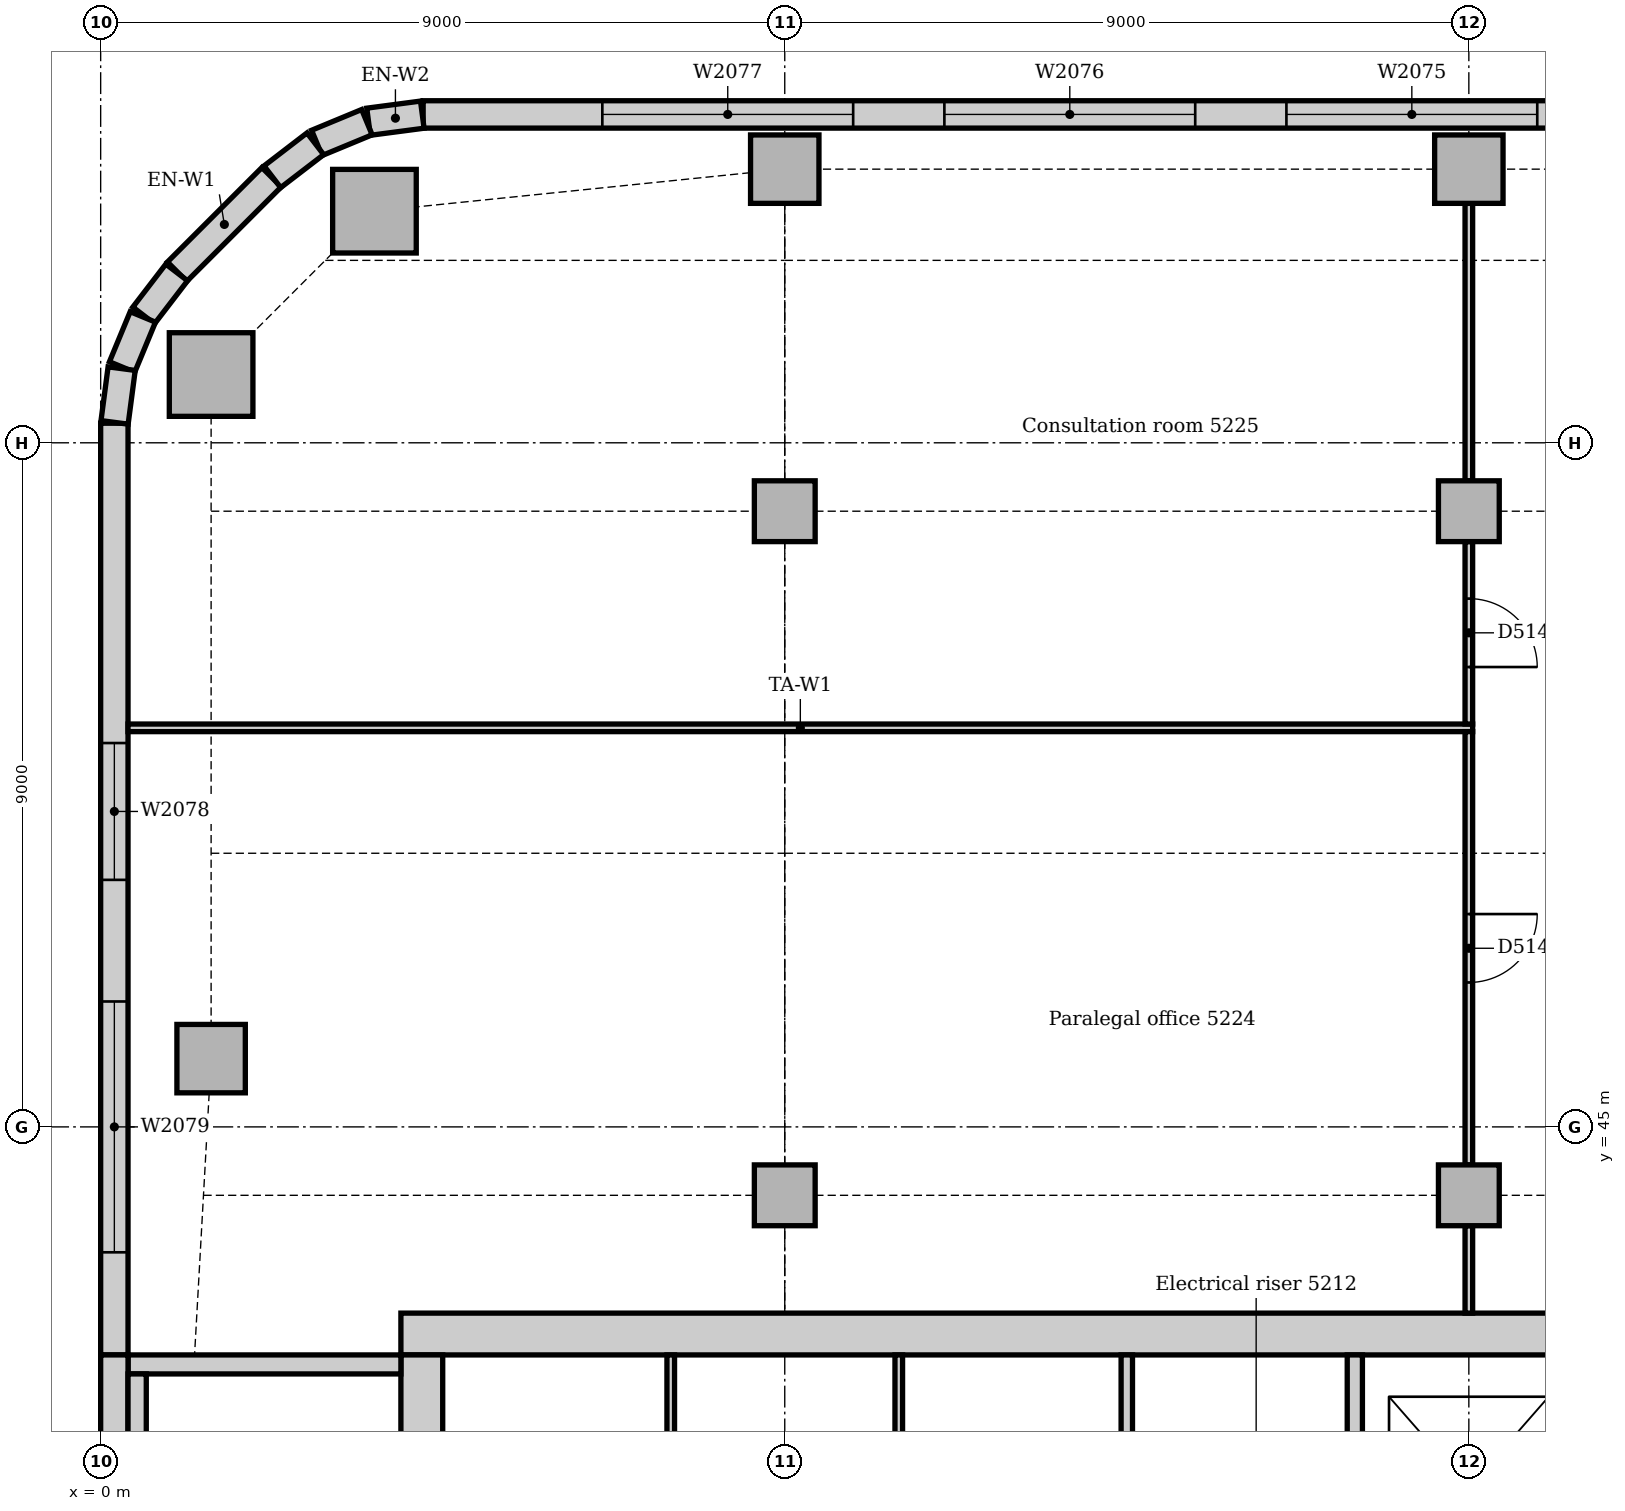
"""IFC4 building model, lengths in metres.
Left out: names, types, materials, properties, quantities, classifications, styles, units other than length and angle.
Written with IfcOpenShell. Run it as: python <this file> out.ifc"""

import sys

from ifc_helpers import new_model, si_unit, direction, frame, frame_2d, origin, origin_2d, place, context, subcontext, project, spatial, rectangle, extrude, element, fill, save


model = new_model("IFC4")
c1 = context("Model", 3, precision=1e-05, world=origin(), true_north=direction((0.0, 1.0)))
c2 = subcontext(c1, "Body", "Model", "MODEL_VIEW")
j1 = project(units=[si_unit("LENGTHUNIT", "METRE"), si_unit("PLANEANGLEUNIT", "RADIAN")], contexts=[c1])
p1 = place(None, origin())
s1 = spatial("IfcSite", under=j1, at=p1, CompositionType="ELEMENT")
p2 = place(p1, origin())
s2 = spatial("IfcBuilding", under=s1, at=p2, CompositionType="ELEMENT")
p3 = place(p2, frame((0.0, 0.0, 218.0)))
s3 = spatial("IfcBuildingStorey", under=s2, at=p3, CompositionType="ELEMENT", Elevation=218.0)
p4 = place(p3, frame((23.05, 42.275, 0.0), z_axis=(0.0, 0.0, 1.0), x_axis=(-1.0, 0.0, 0.0)))
e1 = element("IfcWall", 1, at=p4, inside=s3, PredefinedType="SOLIDWALL", context=c2, shape_type="SweptSolid", body=[
    extrude(rectangle(XDim=19.1, YDim=0.55, at=frame_2d((9.55, 0.0))), origin(), (0.0, 0.0, 1.0), 4.0),
])
p5 = place(p3, frame((4.225, 42.0, 0.0), z_axis=(0.0, 0.0, 1.0), x_axis=(0.0, -1.0, 0.0)))
e2 = element("IfcWall", 2, at=p5, inside=s3, PredefinedType="SOLIDWALL", context=c2, shape_type="SweptSolid", body=[
    extrude(rectangle(XDim=10.5, YDim=0.55, at=frame_2d((5.25, 0.0))), origin(), (0.0, 0.0, 1.0), 4.0),
])
p6 = place(p5, frame((5.3, 0.0, 0.0)))
e3 = element("IfcOpeningElement", 3, at=p6, cuts=e2, PredefinedType="OPENING", context=c2, shape_type="SweptSolid", body=[
    extrude(rectangle(XDim=1.0, YDim=2.1, at=frame_2d((0.5, 1.05))), frame((0.0, 0.285, 0.0), z_axis=(0.0, -1.0, 0.0), x_axis=(1.0, 0.0, 0.0)), (0.0, 0.0, 1.0), 0.57),
])
p7 = place(p3, frame((3.95, 41.875, 0.0), z_axis=(0.0, 0.0, 1.0), x_axis=(-1.0, 0.0, 0.0)))
e4 = element("IfcWall", 4, at=p7, inside=s3, PredefinedType="SOLIDWALL", context=c2, shape_type="SweptSolid", body=[
    extrude(rectangle(XDim=3.59, YDim=0.25, at=frame_2d((1.795, 0.0))), origin(), (0.0, 0.0, 1.0), 4.0),
])
for number, where, z_axis, x_axis in (
    (5, (3.602, 57.047, 0.0), (0.0, 0.0, 1.0), (1.0, 0.0, 0.0)),
    (6, (1.453, 54.898, 0.0), (0.0, 0.0, 1.0), (1.0, 0.0, 0.0)),
):
    element("IfcColumn", number, at=place(p3, frame(where, z_axis=z_axis, x_axis=x_axis)), inside=s3, PredefinedType="COLUMN", context=c2, shape_type="SweptSolid", body=[
        extrude(rectangle(XDim=1.1, YDim=1.1, at=origin_2d()), origin(), (0.0, 0.0, 1.0), 3.85),
    ])
for number, where, z_axis, x_axis in (
    (7, (9.0, 57.6, 0.0), (0.0, 0.0, 1.0), (1.0, 0.0, 0.0)),
    (8, (18.0, 57.6, 0.0), (0.0, 0.0, 1.0), (1.0, 0.0, 0.0)),
    (9, (1.453, 45.898, 0.0), (0.0, 0.0, 1.0), (1.0, 0.0, 0.0)),
):
    element("IfcColumn", number, at=place(p3, frame(where, z_axis=z_axis, x_axis=x_axis)), inside=s3, PredefinedType="COLUMN", context=c2, shape_type="SweptSolid", body=[
        extrude(rectangle(XDim=0.9, YDim=0.9, at=origin_2d()), origin(), (0.0, 0.0, 1.0), 3.85),
    ])
for number, where, z_axis, x_axis in (
    (10, (9.0, 44.1, 0.0), (0.0, 0.0, 1.0), (1.0, 0.0, 0.0)),
    (11, (9.0, 53.1, 0.0), (0.0, 0.0, 1.0), (1.0, 0.0, 0.0)),
    (12, (18.0, 44.1, 0.0), (0.0, 0.0, 1.0), (1.0, 0.0, 0.0)),
    (13, (18.0, 53.1, 0.0), (0.0, 0.0, 1.0), (1.0, 0.0, 0.0)),
):
    element("IfcColumn", number, at=place(p3, frame(where, z_axis=z_axis, x_axis=x_axis)), inside=s3, PredefinedType="COLUMN", context=c2, shape_type="SweptSolid", body=[
        extrude(rectangle(XDim=0.8, YDim=0.8, at=origin_2d()), origin(), (0.0, 0.0, 1.0), 3.85),
    ])
p8 = place(p3, frame((34.757, 58.32, 0.0), z_axis=(0.0, 0.0, 1.0), x_axis=(-1.0, 0.0, 0.0)))
e14 = element("IfcWall", 14, at=p8, inside=s3, PredefinedType="STANDARD", context=c2, shape_type="SweptSolid", body=[
    extrude(rectangle(XDim=30.515, YDim=0.36, at=frame_2d((15.257, 0.0))), origin(), (0.0, 0.0, 1.0), 3.85),
])
p9 = place(p8, frame((2.357, 0.0, 0.9)))
e15 = element("IfcOpeningElement", 15, at=p9, cuts=e14, PredefinedType="OPENING", context=c2, shape_type="SweptSolid", body=[
    extrude(rectangle(XDim=3.3, YDim=1.6, at=frame_2d((1.65, 0.8))), frame((0.0, 0.19, 0.0), z_axis=(0.0, -1.0, 0.0), x_axis=(1.0, 0.0, 0.0)), (0.0, 0.0, 1.0), 0.38),
])
p10 = place(p8, frame((6.857, 0.0, 0.9)))
e16 = element("IfcOpeningElement", 16, at=p10, cuts=e14, PredefinedType="OPENING", context=c2, shape_type="SweptSolid", body=[
    extrude(rectangle(XDim=3.3, YDim=1.6, at=frame_2d((1.65, 0.8))), frame((0.0, 0.19, 0.0), z_axis=(0.0, -1.0, 0.0), x_axis=(1.0, 0.0, 0.0)), (0.0, 0.0, 1.0), 0.38),
])
p11 = place(p8, frame((11.357, 0.0, 0.9)))
e17 = element("IfcOpeningElement", 17, at=p11, cuts=e14, PredefinedType="OPENING", context=c2, shape_type="SweptSolid", body=[
    extrude(rectangle(XDim=3.3, YDim=1.6, at=frame_2d((1.65, 0.8))), frame((0.0, 0.19, 0.0), z_axis=(0.0, -1.0, 0.0), x_axis=(1.0, 0.0, 0.0)), (0.0, 0.0, 1.0), 0.38),
])
p12 = place(p8, frame((15.857, 0.0, 0.9)))
e18 = element("IfcOpeningElement", 18, at=p12, cuts=e14, PredefinedType="OPENING", context=c2, shape_type="SweptSolid", body=[
    extrude(rectangle(XDim=3.3, YDim=1.6, at=frame_2d((1.65, 0.8))), frame((0.0, 0.19, 0.0), z_axis=(0.0, -1.0, 0.0), x_axis=(1.0, 0.0, 0.0)), (0.0, 0.0, 1.0), 0.38),
])
p13 = place(p8, frame((20.357, 0.0, 0.9)))
e19 = element("IfcOpeningElement", 19, at=p13, cuts=e14, PredefinedType="OPENING", context=c2, shape_type="SweptSolid", body=[
    extrude(rectangle(XDim=3.3, YDim=1.6, at=frame_2d((1.65, 0.8))), frame((0.0, 0.19, 0.0), z_axis=(0.0, -1.0, 0.0), x_axis=(1.0, 0.0, 0.0)), (0.0, 0.0, 1.0), 0.38),
])
p14 = place(p8, frame((24.857, 0.0, 0.9)))
e20 = element("IfcOpeningElement", 20, at=p14, cuts=e14, PredefinedType="OPENING", context=c2, shape_type="SweptSolid", body=[
    extrude(rectangle(XDim=3.3, YDim=1.6, at=frame_2d((1.65, 0.8))), frame((0.0, 0.19, 0.0), z_axis=(0.0, -1.0, 0.0), x_axis=(1.0, 0.0, 0.0)), (0.0, 0.0, 1.0), 0.38),
])
p15 = place(p3, frame((2.249, 57.494, 0.0), z_axis=(0.0, 0.0, 1.0), x_axis=(-0.707106781187, -0.707106781187, 0.0)))
e21 = element("IfcWall", 21, at=p15, inside=s3, PredefinedType="STANDARD", context=c2, shape_type="SweptSolid", body=[
    extrude(rectangle(XDim=1.757, YDim=0.36, at=frame_2d((0.879, 0.0))), origin(), (0.0, 0.0, 1.0), 3.85),
])
p16 = place(p3, frame((0.18, 54.257, 0.0), z_axis=(0.0, 0.0, 1.0), x_axis=(0.0, -1.0, 0.0)))
e22 = element("IfcWall", 22, at=p16, inside=s3, PredefinedType="STANDARD", context=c2, shape_type="SweptSolid", body=[
    extrude(rectangle(XDim=12.257, YDim=0.36, at=frame_2d((6.129, 0.0))), origin(), (0.0, 0.0, 1.0), 3.85),
])
p17 = place(p16, frame((4.207, 0.0, 0.9)))
e23 = element("IfcOpeningElement", 23, at=p17, cuts=e22, PredefinedType="OPENING", context=c2, shape_type="SweptSolid", body=[
    extrude(rectangle(XDim=1.8, YDim=1.6, at=frame_2d((0.9, 0.8))), frame((0.0, 0.19, 0.0), z_axis=(0.0, -1.0, 0.0), x_axis=(1.0, 0.0, 0.0)), (0.0, 0.0, 1.0), 0.38),
])
p18 = place(p16, frame((7.607, 0.0, 0.9)))
e24 = element("IfcOpeningElement", 24, at=p18, cuts=e22, PredefinedType="OPENING", context=c2, shape_type="SweptSolid", body=[
    extrude(rectangle(XDim=3.3, YDim=1.6, at=frame_2d((1.65, 0.8))), frame((0.0, 0.19, 0.0), z_axis=(0.0, -1.0, 0.0), x_axis=(1.0, 0.0, 0.0)), (0.0, 0.0, 1.0), 0.38),
])
p19 = place(p3, frame((0.18, 42.0, 0.0), z_axis=(0.0, 0.0, 1.0), x_axis=(0.0, -1.0, 0.0)))
e25 = element("IfcWall", 25, at=p19, inside=s3, PredefinedType="STANDARD", context=c2, shape_type="SweptSolid", body=[
    extrude(rectangle(XDim=6.75, YDim=0.36, at=frame_2d((3.375, 0.0))), origin(), (0.0, 0.0, 1.0), 3.85),
])
for number, where, z_axis, x_axis in (
    (26, (4.231, 58.317, 0.0), (0.0, 0.0, 1.0), (-0.991, -0.131, 0.0)),
    (27, (3.503, 58.218, 0.0), (0.0, 0.0, 1.0), (-0.924, -0.383, 0.0)),
):
    element("IfcWall", number, at=place(p3, frame(where, z_axis=z_axis, x_axis=x_axis)), inside=s3, PredefinedType="STANDARD", context=c2, shape_type="SweptSolid", body=[
        extrude(rectangle(XDim=0.713, YDim=0.36, at=frame_2d((0.356, 0.0))), origin(), (0.0, 0.0, 1.0), 3.85),
    ])
for number, where, z_axis, x_axis in (
    (28, (2.825, 57.934, 0.0), (0.0, 0.0, 1.0), (-0.793, -0.609, 0.0)),
    (29, (1.0, 56.241, 0.0), (0.0, 0.0, 1.0), (-0.609, -0.793, 0.0)),
):
    element("IfcWall", number, at=place(p3, frame(where, z_axis=z_axis, x_axis=x_axis)), inside=s3, PredefinedType="STANDARD", context=c2, shape_type="SweptSolid", body=[
        extrude(rectangle(XDim=0.713, YDim=0.36, at=frame_2d((0.357, 0.0))), origin(), (0.0, 0.0, 1.0), 3.85),
    ])
for number, where, z_axis, x_axis in (
    (30, (0.555, 55.656, 0.0), (0.0, 0.0, 1.0), (-0.383, -0.924, 0.0)),
    (31, (0.276, 54.976, 0.0), (0.0, 0.0, 1.0), (-0.131, -0.991, 0.0)),
):
    element("IfcWall", number, at=place(p3, frame(where, z_axis=z_axis, x_axis=x_axis)), inside=s3, PredefinedType="STANDARD", context=c2, shape_type="SweptSolid", body=[
        extrude(rectangle(XDim=0.713, YDim=0.36, at=frame_2d((0.356, 0.0))), origin(), (0.0, 0.0, 1.0), 3.85),
    ])
p20 = place(p3, frame((0.48, 40.13, 0.0), z_axis=(0.0, 0.0, 1.0), x_axis=(0.0, 1.0, 0.0)))
e32 = element("IfcWall", 32, at=p20, inside=s3, PredefinedType="STANDARD", context=c2, shape_type="SweptSolid", body=[
    extrude(rectangle(XDim=1.62, YDim=0.24, at=frame_2d((0.81, 0.0))), origin(), (0.0, 0.0, 1.0), 4.0),
])
p21 = place(p3, frame((16.5, 38.6, 0.0), z_axis=(0.0, 0.0, 1.0), x_axis=(0.0, 1.0, 0.0)))
e33 = element("IfcWall", 33, at=p21, inside=s3, PredefinedType="PARTITIONING", context=c2, shape_type="SweptSolid", body=[
    extrude(rectangle(XDim=3.4, YDim=0.2, at=frame_2d((1.7, 0.0))), origin(), (0.0, 0.0, 1.0), 3.85),
])
p22 = place(p3, frame((13.5, 38.575, 0.0), z_axis=(0.0, 0.0, 1.0), x_axis=(0.0, 1.0, 0.0)))
e34 = element("IfcWall", 34, at=p22, inside=s3, PredefinedType="PARTITIONING", context=c2, shape_type="SweptSolid", body=[
    extrude(rectangle(XDim=3.425, YDim=0.15, at=frame_2d((1.712, 0.0))), origin(), (0.0, 0.0, 1.0), 3.85),
])
p23 = place(p3, frame((0.36, 50.25, 0.0), z_axis=(0.0, 0.0, 1.0), x_axis=(1.0, 0.0, 0.0)))
e35 = element("IfcWall", 35, at=p23, inside=s3, PredefinedType="PARTITIONING", context=c2, shape_type="SweptSolid", body=[
    extrude(rectangle(XDim=17.69, YDim=0.1, at=frame_2d((8.845, 0.0))), origin(), (0.0, 0.0, 1.0), 3.85),
])
p24 = place(p3, frame((18.0, 42.55, 0.0), z_axis=(0.0, 0.0, 1.0), x_axis=(0.0, 1.0, 0.0)))
e36 = element("IfcWall", 36, at=p24, inside=s3, PredefinedType="PARTITIONING", context=c2, shape_type="SweptSolid", body=[
    extrude(rectangle(XDim=1.15, YDim=0.1, at=frame_2d((0.575, 0.0))), origin(), (0.0, 0.0, 1.0), 3.652),
])
p25 = place(p3, frame((18.0, 50.3, 0.0), z_axis=(0.0, 0.0, 1.0), x_axis=(0.0, 1.0, 0.0)))
e37 = element("IfcWall", 37, at=p25, inside=s3, PredefinedType="PARTITIONING", context=c2, shape_type="SweptSolid", body=[
    extrude(rectangle(XDim=2.4, YDim=0.1, at=frame_2d((1.2, 0.0))), origin(), (0.0, 0.0, 1.0), 3.35),
])
p26 = place(p25, frame((0.75, 0.0, 0.0)))
e38 = element("IfcOpeningElement", 38, at=p26, cuts=e37, PredefinedType="OPENING", context=c2, shape_type="SweptSolid", body=[
    extrude(rectangle(XDim=0.9, YDim=2.1, at=frame_2d((0.45, 1.05))), frame((0.0, 0.06, 0.0), z_axis=(0.0, -1.0, 0.0), x_axis=(1.0, 0.0, 0.0)), (0.0, 0.0, 1.0), 0.12),
])
p27 = place(p3, frame((18.0, 44.5, 0.0), z_axis=(0.0, 0.0, 1.0), x_axis=(0.0, 1.0, 0.0)))
e39 = element("IfcWall", 39, at=p27, inside=s3, PredefinedType="PARTITIONING", context=c2, shape_type="SweptSolid", body=[
    extrude(rectangle(XDim=5.7, YDim=0.1, at=frame_2d((2.85, 0.0))), origin(), (0.0, 0.0, 1.0), 3.35),
])
p28 = place(p27, frame((2.4, 0.0, 0.0)))
e40 = element("IfcOpeningElement", 40, at=p28, cuts=e39, PredefinedType="OPENING", context=c2, shape_type="SweptSolid", body=[
    extrude(rectangle(XDim=0.9, YDim=2.1, at=frame_2d((0.45, 1.05))), frame((0.0, 0.06, 0.0), z_axis=(0.0, -1.0, 0.0), x_axis=(1.0, 0.0, 0.0)), (0.0, 0.0, 1.0), 0.12),
])
p29 = place(p3, frame((18.0, 53.5, 0.0), z_axis=(0.0, 0.0, 1.0), x_axis=(0.0, 1.0, 0.0)))
e41 = element("IfcWall", 41, at=p29, inside=s3, PredefinedType="PARTITIONING", context=c2, shape_type="SweptSolid", body=[
    extrude(rectangle(XDim=3.65, YDim=0.1, at=frame_2d((1.825, 0.0))), origin(), (0.0, 0.0, 1.0), 3.41),
])
for number, where, z_axis, x_axis in (
    (42, (7.5, 38.575, 0.0), (0.0, 0.0, 1.0), (0.0, 1.0, 0.0)),
    (43, (10.5, 38.575, 0.0), (0.0, 0.0, 1.0), (0.0, 1.0, 0.0)),
):
    element("IfcWall", number, at=place(p3, frame(where, z_axis=z_axis, x_axis=x_axis)), inside=s3, PredefinedType="PARTITIONING", context=c2, shape_type="SweptSolid", body=[
        extrude(rectangle(XDim=3.425, YDim=0.1, at=frame_2d((1.712, 0.0))), origin(), (0.0, 0.0, 1.0), 3.85),
    ])
p30 = place(p12, origin())
e44 = element("IfcWindow", 44, at=p30, inside=s3, PartitioningType="SINGLE_PANEL", PredefinedType="WINDOW", context=c2, shape_type="SweptSolid", body=[
    extrude(rectangle(XDim=3.3, YDim=1.6, at=frame_2d((1.65, 0.8))), frame((0.0, 0.13, 0.0), z_axis=(0.0, -1.0, 0.0), x_axis=(1.0, 0.0, 0.0)), (0.0, 0.0, 1.0), 0.06),
])
fill(e18, e44)
p31 = place(p13, origin())
e45 = element("IfcWindow", 45, at=p31, inside=s3, PartitioningType="SINGLE_PANEL", PredefinedType="WINDOW", context=c2, shape_type="SweptSolid", body=[
    extrude(rectangle(XDim=3.3, YDim=1.6, at=frame_2d((1.65, 0.8))), frame((0.0, 0.13, 0.0), z_axis=(0.0, -1.0, 0.0), x_axis=(1.0, 0.0, 0.0)), (0.0, 0.0, 1.0), 0.06),
])
fill(e19, e45)
p32 = place(p14, origin())
e46 = element("IfcWindow", 46, at=p32, inside=s3, PartitioningType="SINGLE_PANEL", PredefinedType="WINDOW", context=c2, shape_type="SweptSolid", body=[
    extrude(rectangle(XDim=3.3, YDim=1.6, at=frame_2d((1.65, 0.8))), frame((0.0, 0.13, 0.0), z_axis=(0.0, -1.0, 0.0), x_axis=(1.0, 0.0, 0.0)), (0.0, 0.0, 1.0), 0.06),
])
fill(e20, e46)
p33 = place(p17, origin())
e47 = element("IfcWindow", 47, at=p33, inside=s3, PartitioningType="SINGLE_PANEL", PredefinedType="WINDOW", context=c2, shape_type="SweptSolid", body=[
    extrude(rectangle(XDim=1.8, YDim=1.6, at=frame_2d((0.9, 0.8))), frame((0.0, 0.13, 0.0), z_axis=(0.0, -1.0, 0.0), x_axis=(1.0, 0.0, 0.0)), (0.0, 0.0, 1.0), 0.06),
])
fill(e23, e47)
p34 = place(p18, origin())
e48 = element("IfcWindow", 48, at=p34, inside=s3, PartitioningType="SINGLE_PANEL", PredefinedType="WINDOW", context=c2, shape_type="SweptSolid", body=[
    extrude(rectangle(XDim=3.3, YDim=1.6, at=frame_2d((1.65, 0.8))), frame((0.0, 0.13, 0.0), z_axis=(0.0, -1.0, 0.0), x_axis=(1.0, 0.0, 0.0)), (0.0, 0.0, 1.0), 0.06),
])
fill(e24, e48)
p35 = place(p28, frame((0.9, 0.0, 0.0), z_axis=(0.0, 0.0, 1.0), x_axis=(-1.0, 0.0, 0.0)))
e49 = element("IfcDoor", 49, at=p35, inside=s3, OperationType="SINGLE_SWING_LEFT", PredefinedType="DOOR", context=c2, shape_type="SweptSolid", body=[
    extrude(rectangle(XDim=0.9, YDim=2.1, at=frame_2d((0.45, 1.05))), frame((0.0, 0.025, 0.0), z_axis=(0.0, -1.0, 0.0), x_axis=(1.0, 0.0, 0.0)), (0.0, 0.0, 1.0), 0.05),
])
fill(e40, e49)
p36 = place(p26, frame((0.9, 0.0, 0.0), z_axis=(0.0, 0.0, 1.0), x_axis=(-1.0, 0.0, 0.0)))
e50 = element("IfcDoor", 50, at=p36, inside=s3, OperationType="SINGLE_SWING_RIGHT", PredefinedType="DOOR", context=c2, shape_type="SweptSolid", body=[
    extrude(rectangle(XDim=0.9, YDim=2.1, at=frame_2d((0.45, 1.05))), frame((0.0, 0.025, 0.0), z_axis=(0.0, -1.0, 0.0), x_axis=(1.0, 0.0, 0.0)), (0.0, 0.0, 1.0), 0.05),
])
fill(e38, e50)
save(model, sys.argv[1])
